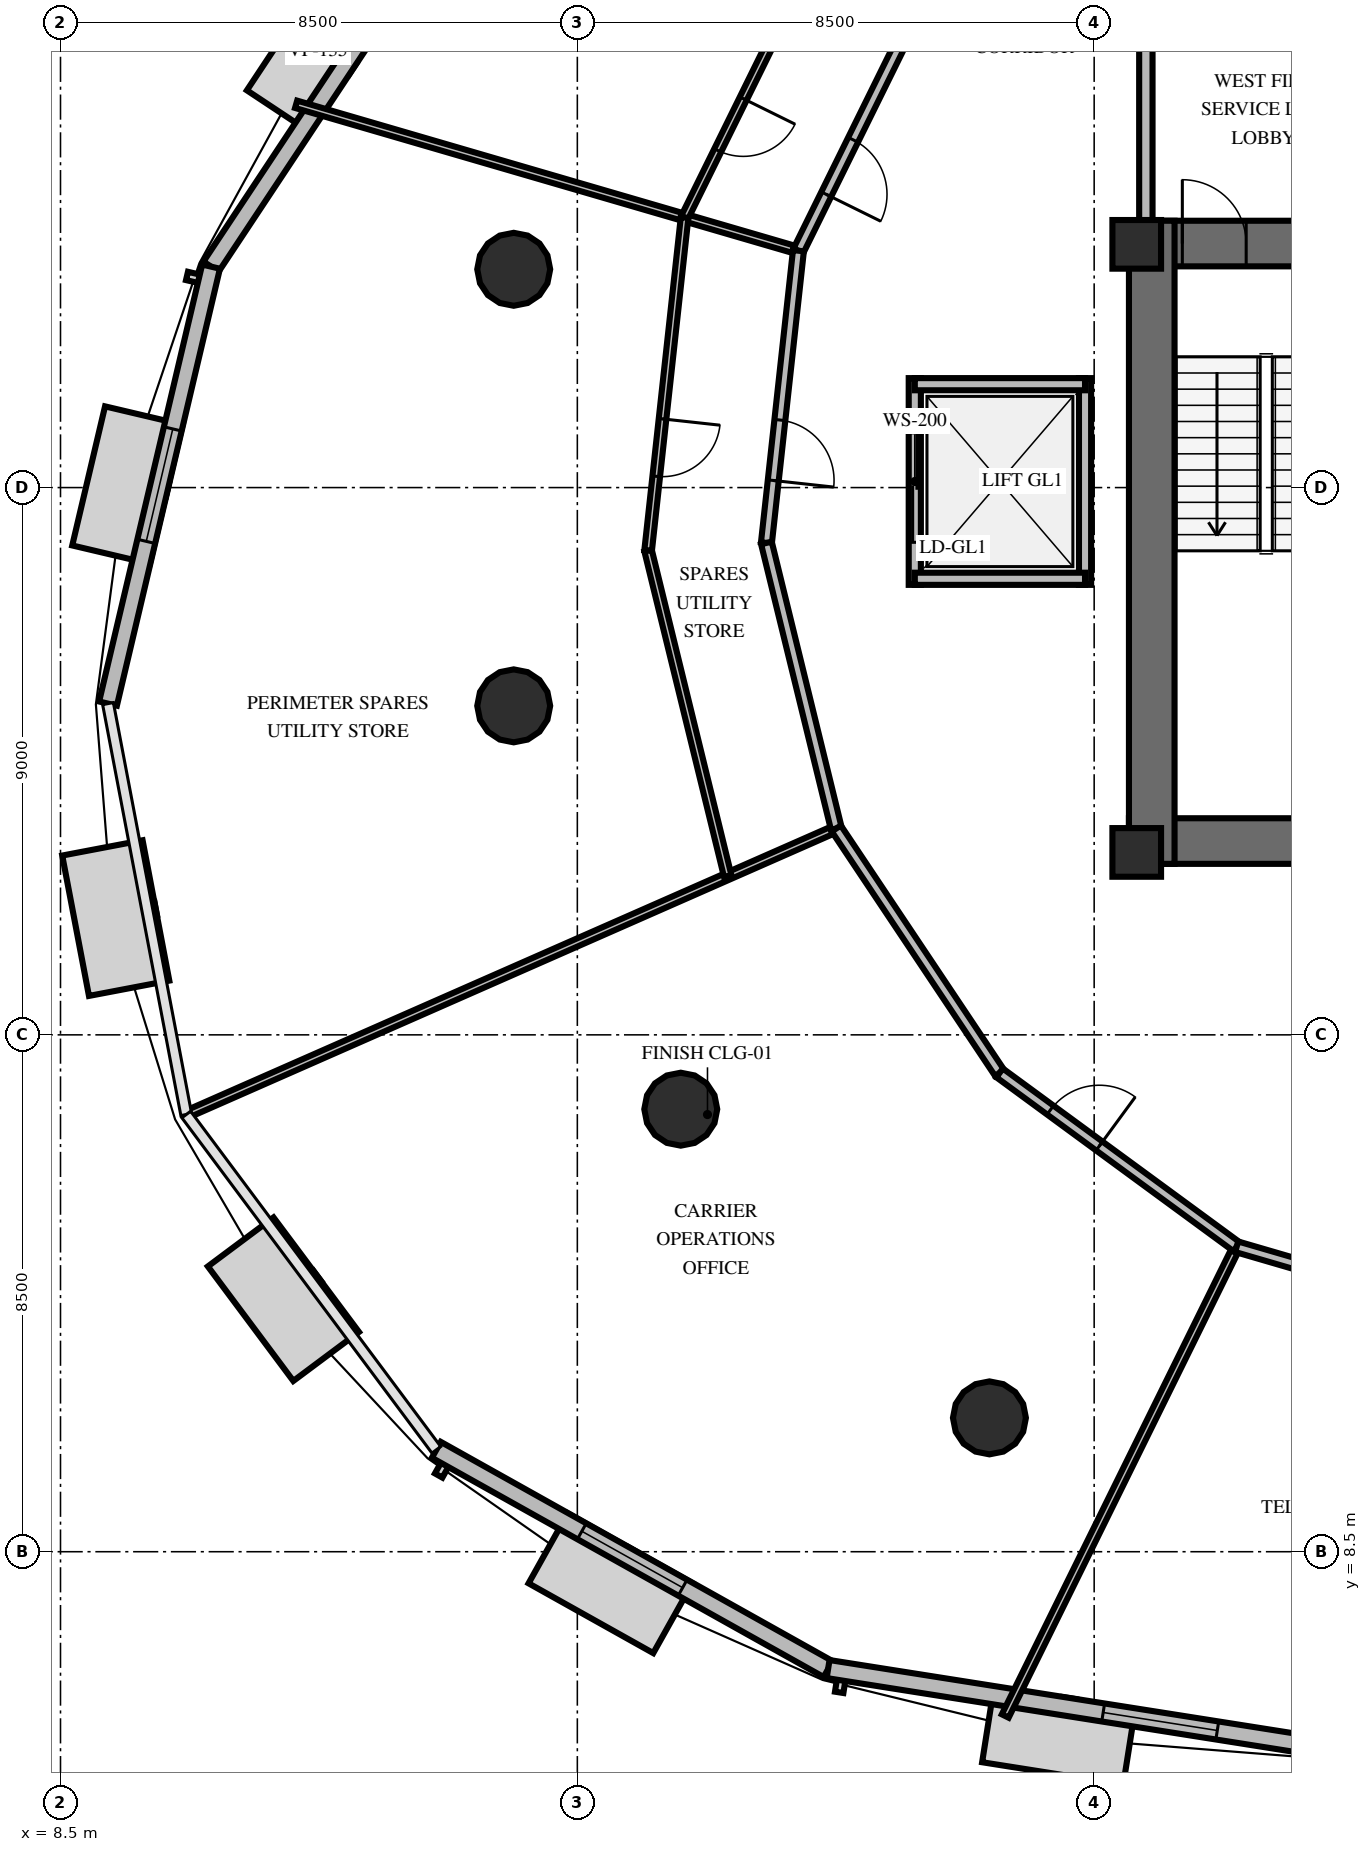
"""IFC4 building model, lengths in metres.
Left out: names, types, materials, properties, quantities, classifications, styles, units other than length and angle.
Written with IfcOpenShell. Run it as: python <this file> out.ifc"""

import sys

from ifc_helpers import new_model, si_unit, direction, frame, frame_2d, origin, origin_2d, place, context, subcontext, project, spatial, rectangle, circle, extrude, element, fill, save


model = new_model("IFC4")
c1 = context("Model", 3, precision=1e-05, world=origin(), true_north=direction((0.0, 1.0)))
c2 = subcontext(c1, "Body", "Model", "MODEL_VIEW")
j1 = project(units=[si_unit("LENGTHUNIT", "METRE"), si_unit("PLANEANGLEUNIT", "RADIAN")], contexts=[c1])
p1 = place(None, origin())
s1 = spatial("IfcSite", under=j1, at=p1, CompositionType="ELEMENT")
p2 = place(p1, origin())
s2 = spatial("IfcBuilding", under=s1, at=p2, CompositionType="ELEMENT")
p3 = place(p2, frame((0.0, 0.0, 133.8)))
s3 = spatial("IfcBuildingStorey", under=s2, at=p3, CompositionType="ELEMENT", Elevation=133.8)
p4 = place(p3, frame((26.072, 20.187, 0.0), z_axis=(0.0, 0.0, 1.0), x_axis=(1.0, 0.0, 0.0)))
e1 = element("IfcWall", 1, at=p4, inside=s3, PredefinedType="SHEAR", context=c2, shape_type="SweptSolid", body=[
    extrude(rectangle(XDim=15.866, YDim=0.75, at=frame_2d((7.933, 0.0))), origin(), (0.0, 0.0, 1.0), 4.0),
])
p5 = place(p3, frame((26.072, 30.013, 0.0), z_axis=(0.0, 0.0, 1.0), x_axis=(1.0, 0.0, 0.0)))
e2 = element("IfcWall", 2, at=p5, inside=s3, PredefinedType="SHEAR", context=c2, shape_type="SweptSolid", body=[
    extrude(rectangle(XDim=15.866, YDim=0.75, at=frame_2d((7.933, 0.0))), origin(), (0.0, 0.0, 1.0), 4.0),
])
p6 = place(p5, frame((0.878, 0.0, 0.0)))
e3 = element("IfcOpeningElement", 3, at=p6, cuts=e2, PredefinedType="OPENING", context=c2, shape_type="SweptSolid", body=[
    extrude(rectangle(XDim=1.05, YDim=2.15, at=frame_2d((0.525, 1.075))), frame((0.0, 0.385, 0.0), z_axis=(0.0, -1.0, 0.0), x_axis=(1.0, 0.0, 0.0)), (0.0, 0.0, 1.0), 0.77),
])
p7 = place(p5, frame((13.928, 0.0, 0.0)))
e4 = element("IfcOpeningElement", 4, at=p7, cuts=e2, PredefinedType="OPENING", context=c2, shape_type="SweptSolid", body=[
    extrude(rectangle(XDim=1.05, YDim=2.15, at=frame_2d((0.525, 1.075))), frame((0.0, 0.385, 0.0), z_axis=(0.0, -1.0, 0.0), x_axis=(1.0, 0.0, 0.0)), (0.0, 0.0, 1.0), 0.77),
])
p8 = place(p5, frame((7.378, 0.0, 0.0)))
e5 = element("IfcOpeningElement", 5, at=p8, cuts=e2, PredefinedType="OPENING", context=c2, shape_type="SweptSolid", body=[
    extrude(rectangle(XDim=1.1, YDim=2.15, at=frame_2d((0.55, 1.075))), frame((0.0, 0.385, 0.0), z_axis=(0.0, -1.0, 0.0), x_axis=(1.0, 0.0, 0.0)), (0.0, 0.0, 1.0), 0.77),
])
p9 = place(p3, frame((26.447, 19.812, 0.0), z_axis=(0.0, 0.0, 1.0), x_axis=(0.0, 1.0, 0.0)))
e6 = element("IfcWall", 6, at=p9, inside=s3, PredefinedType="SHEAR", context=c2, shape_type="SweptSolid", body=[
    extrude(rectangle(XDim=10.576, YDim=0.75, at=frame_2d((5.288, 0.0))), origin(), (0.0, 0.0, 1.0), 4.0),
])
for number, where, z_axis, x_axis in (
    (7, (26.2, 20.0, 0.0), (0.0, 0.0, 1.0), (1.0, 0.0, 0.0)),
    (8, (26.2, 30.0, 0.0), (0.0, 0.0, 1.0), (1.0, 0.0, 0.0)),
):
    element("IfcColumn", number, at=place(p3, frame(where, z_axis=z_axis, x_axis=x_axis)), inside=s3, PredefinedType="PILASTER", context=c2, shape_type="SweptSolid", body=[
        extrude(rectangle(XDim=0.8, YDim=0.8, at=origin_2d()), origin(), (0.0, 0.0, 1.0), 4.0),
    ])
for number, where, z_axis, x_axis in (
    (9, (15.954, 29.59, 0.0), (0.0, 0.0, 1.0), (1.0, 0.0, 0.0)),
    (10, (15.954, 22.41, 0.0), (0.0, 0.0, 1.0), (1.0, 0.0, 0.0)),
    (11, (18.701, 15.778, 0.0), (0.0, 0.0, 1.0), (1.0, 0.0, 0.0)),
    (12, (23.778, 10.701, 0.0), (0.0, 0.0, 1.0), (1.0, 0.0, 0.0)),
):
    element("IfcColumn", number, at=place(p3, frame(where, z_axis=z_axis, x_axis=x_axis)), inside=s3, PredefinedType="COLUMN", context=c2, shape_type="SweptSolid", body=[
        extrude(circle(Radius=0.6, at=origin_2d()), origin(), (0.0, 0.0, 1.0), 4.0),
    ])
p10 = place(p3, frame((15.448, 36.381, 0.0), z_axis=(0.0, 0.0, 1.0), x_axis=(-0.552401321334, -0.833578298775, 0.0)))
e13 = element("IfcWall", 13, at=p10, inside=s3, PredefinedType="SOLIDWALL", context=c2, shape_type="SweptSolid", body=[
    extrude(rectangle(XDim=8.095, YDim=0.3, at=frame_2d((4.047, 0.0))), origin(), (0.0, 0.0, 1.0), 2.9),
])
p11 = place(p10, frame((1.615, 0.0, 0.8)))
e14 = element("IfcOpeningElement", 14, at=p11, cuts=e13, PredefinedType="OPENING", context=c2, shape_type="SweptSolid", body=[
    extrude(rectangle(XDim=1.9, YDim=1.95, at=frame_2d((0.95, 0.975))), frame((0.0, 0.16, 0.0), z_axis=(0.0, -1.0, 0.0), x_axis=(1.0, 0.0, 0.0)), (0.0, 0.0, 1.0), 0.32),
])
p12 = place(p3, frame((10.976, 29.634, 0.0), z_axis=(0.0, 0.0, 1.0), x_axis=(-0.229551679133, -0.973296474157, 0.0)))
e15 = element("IfcWall", 15, at=p12, inside=s3, PredefinedType="SOLIDWALL", context=c2, shape_type="SweptSolid", body=[
    extrude(rectangle(XDim=7.383, YDim=0.3, at=frame_2d((3.692, 0.0))), origin(), (0.0, 0.0, 1.0), 2.9),
])
p13 = place(p12, frame((2.742, 0.0, 0.8)))
e16 = element("IfcOpeningElement", 16, at=p13, cuts=e15, PredefinedType="OPENING", context=c2, shape_type="SweptSolid", body=[
    extrude(rectangle(XDim=1.9, YDim=1.95, at=frame_2d((0.95, 0.975))), frame((0.0, 0.16, 0.0), z_axis=(0.0, -1.0, 0.0), x_axis=(1.0, 0.0, 0.0)), (0.0, 0.0, 1.0), 0.32),
])
p14 = place(p3, frame((14.681, 10.176, 0.0), z_axis=(0.0, 0.0, 1.0), x_axis=(0.872674562052, -0.488302271904, 0.0)))
e17 = element("IfcWall", 17, at=p14, inside=s3, PredefinedType="SOLIDWALL", context=c2, shape_type="SweptSolid", body=[
    extrude(rectangle(XDim=7.383, YDim=0.3, at=frame_2d((3.692, 0.0))), origin(), (0.0, 0.0, 1.0), 2.9),
])
p15 = place(p14, frame((2.742, 0.0, 0.8)))
e18 = element("IfcOpeningElement", 18, at=p15, cuts=e17, PredefinedType="OPENING", context=c2, shape_type="SweptSolid", body=[
    extrude(rectangle(XDim=1.9, YDim=1.95, at=frame_2d((0.95, 0.975))), frame((0.0, 0.16, 0.0), z_axis=(0.0, -1.0, 0.0), x_axis=(1.0, 0.0, 0.0)), (0.0, 0.0, 1.0), 0.32),
])
p16 = place(p3, frame((21.124, 6.57, 0.0), z_axis=(0.0, 0.0, 1.0), x_axis=(0.987774699815, -0.155888236905, 0.0)))
e19 = element("IfcWall", 19, at=p16, inside=s3, PredefinedType="SOLIDWALL", context=c2, shape_type="SweptSolid", body=[
    extrude(rectangle(XDim=8.095, YDim=0.3, at=frame_2d((4.048, 0.0))), origin(), (0.0, 0.0, 1.0), 2.9),
])
p17 = place(p16, frame((4.58, 0.0, 0.8)))
e20 = element("IfcOpeningElement", 20, at=p17, cuts=e19, PredefinedType="OPENING", context=c2, shape_type="SweptSolid", body=[
    extrude(rectangle(XDim=1.9, YDim=1.95, at=frame_2d((0.95, 0.975))), frame((0.0, 0.16, 0.0), z_axis=(0.0, -1.0, 0.0), x_axis=(1.0, 0.0, 0.0)), (0.0, 0.0, 1.0), 0.32),
])
p18 = place(p3, frame((26.35, 30.05, 0.0), z_axis=(0.0, 0.0, 1.0), x_axis=(0.0, 1.0, 0.0)))
e21 = element("IfcWall", 21, at=p18, inside=s3, PredefinedType="SOLIDWALL", context=c2, shape_type="SweptSolid", body=[
    extrude(rectangle(XDim=4.38, YDim=0.22, at=frame_2d((2.19, 0.0))), origin(), (0.0, 0.0, 1.0), 2.8),
])
p19 = place(p3, frame((22.55, 24.4, 0.0), z_axis=(0.0, 0.0, 1.0), x_axis=(0.0, 1.0, 0.0)))
e22 = element("IfcWall", 22, at=p19, inside=s3, PredefinedType="SOLIDWALL", context=c2, shape_type="SweptSolid", body=[
    extrude(rectangle(XDim=3.4, YDim=0.2, at=frame_2d((1.7, 0.0))), origin(), (0.0, 0.0, 1.0), 2.8),
])
p20 = place(p19, frame((0.7, 0.0, 0.0)))
e23 = element("IfcOpeningElement", 23, at=p20, cuts=e22, PredefinedType="OPENING", context=c2, shape_type="SweptSolid", body=[
    extrude(rectangle(XDim=1.8, YDim=2.4, at=frame_2d((0.9, 1.2))), frame((0.0, 0.11, 0.0), z_axis=(0.0, -1.0, 0.0), x_axis=(1.0, 0.0, 0.0)), (0.0, 0.0, 1.0), 0.22),
])
p21 = place(p3, frame((25.35, 24.4, 0.0), z_axis=(0.0, 0.0, 1.0), x_axis=(0.0, 1.0, 0.0)))
e24 = element("IfcWall", 24, at=p21, inside=s3, PredefinedType="SOLIDWALL", context=c2, shape_type="SweptSolid", body=[
    extrude(rectangle(XDim=3.4, YDim=0.2, at=frame_2d((1.7, 0.0))), origin(), (0.0, 0.0, 1.0), 2.8),
])
for number, where, z_axis, x_axis in (
    (25, (22.55, 24.5, 0.0), (0.0, 0.0, 1.0), (1.0, 0.0, 0.0)),
    (26, (22.55, 27.7, 0.0), (0.0, 0.0, 1.0), (1.0, 0.0, 0.0)),
):
    element("IfcWall", number, at=place(p3, frame(where, z_axis=z_axis, x_axis=x_axis)), inside=s3, PredefinedType="SOLIDWALL", context=c2, shape_type="SweptSolid", body=[
        extrude(rectangle(XDim=2.8, YDim=0.2, at=frame_2d((1.4, 0.0))), origin(), (0.0, 0.0, 1.0), 2.8),
    ])
p22 = place(p3, frame((20.636, 29.895, 0.0), z_axis=(0.0, 0.0, 1.0), x_axis=(-0.960054321728, 0.279813686819, 0.0)))
e27 = element("IfcWall", 27, at=p22, inside=s3, PredefinedType="PARTITIONING", context=c2, shape_type="SweptSolid", body=[
    extrude(rectangle(XDim=8.605, YDim=0.125, at=frame_2d((4.302, 0.0))), origin(), (0.0, 0.0, 1.0), 2.8),
])
p23 = place(p3, frame((22.774, 34.231, 0.0), z_axis=(0.0, 0.0, 1.0), x_axis=(-0.442338670076, -0.896848092463, 0.0)))
e28 = element("IfcWall", 28, at=p23, inside=s3, PredefinedType="PARTITIONING", context=c2, shape_type="SweptSolid", body=[
    extrude(rectangle(XDim=4.834, YDim=0.18, at=frame_2d((2.417, 0.0))), origin(), (0.0, 0.0, 1.0), 2.8),
])
p24 = place(p23, frame((2.801, 0.0, 0.0)))
e29 = element("IfcOpeningElement", 29, at=p24, cuts=e28, PredefinedType="OPENING", context=c2, shape_type="SweptSolid", body=[
    extrude(rectangle(XDim=1.0, YDim=2.15, at=frame_2d((0.5, 1.075))), frame((0.0, 0.1, 0.0), z_axis=(0.0, -1.0, 0.0), x_axis=(1.0, 0.0, 0.0)), (0.0, 0.0, 1.0), 0.2),
])
p25 = place(p3, frame((21.202, 35.384, 0.0), z_axis=(0.0, 0.0, 1.0), x_axis=(-0.442298829349, -0.896867741396, 0.0)))
e30 = element("IfcWall", 30, at=p25, inside=s3, PredefinedType="PARTITIONING", context=c2, shape_type="SweptSolid", body=[
    extrude(rectangle(XDim=5.511, YDim=0.125, at=frame_2d((2.756, 0.0))), origin(), (0.0, 0.0, 1.0), 2.8),
])
p26 = place(p25, frame((3.331, 0.0, 0.0)))
e31 = element("IfcOpeningElement", 31, at=p26, cuts=e30, PredefinedType="OPENING", context=c2, shape_type="SweptSolid", body=[
    extrude(rectangle(XDim=0.95, YDim=2.15, at=frame_2d((0.475, 1.075))), frame((0.0, 0.073, 0.0), z_axis=(0.0, -1.0, 0.0), x_axis=(1.0, 0.0, 0.0)), (0.0, 0.0, 1.0), 0.145),
])
p27 = place(p3, frame((21.259, 20.394, 0.0), z_axis=(0.0, 0.0, 1.0), x_axis=(-0.915308559751, -0.402753324563, 0.0)))
e32 = element("IfcWall", 32, at=p27, inside=s3, PredefinedType="PARTITIONING", context=c2, shape_type="SweptSolid", body=[
    extrude(rectangle(XDim=11.68, YDim=0.125, at=frame_2d((5.84, 0.0))), origin(), (0.0, 0.0, 1.0), 2.8),
])
p28 = place(p3, frame((20.636, 29.895, 0.0), z_axis=(0.0, 0.0, 1.0), x_axis=(-0.108829517581, -0.994060428799, 0.0)))
e33 = element("IfcWall", 33, at=p28, inside=s3, PredefinedType="PARTITIONING", context=c2, shape_type="SweptSolid", body=[
    extrude(rectangle(XDim=4.834, YDim=0.18, at=frame_2d((2.417, 0.0))), origin(), (0.0, 0.0, 1.0), 2.8),
])
p29 = place(p28, frame((2.801, 0.0, 0.0)))
e34 = element("IfcOpeningElement", 34, at=p29, cuts=e33, PredefinedType="OPENING", context=c2, shape_type="SweptSolid", body=[
    extrude(rectangle(XDim=1.0, YDim=2.15, at=frame_2d((0.5, 1.075))), frame((0.0, 0.1, 0.0), z_axis=(0.0, -1.0, 0.0), x_axis=(1.0, 0.0, 0.0)), (0.0, 0.0, 1.0), 0.2),
])
p30 = place(p3, frame((20.11, 25.09, 0.0), z_axis=(0.0, 0.0, 1.0), x_axis=(0.237660645322, -0.971348247368, 0.0)))
e35 = element("IfcWall", 35, at=p30, inside=s3, PredefinedType="PARTITIONING", context=c2, shape_type="SweptSolid", body=[
    extrude(rectangle(XDim=4.834, YDim=0.18, at=frame_2d((2.417, 0.0))), origin(), (0.0, 0.0, 1.0), 2.8),
])
p31 = place(p3, frame((18.764, 30.441, 0.0), z_axis=(0.0, 0.0, 1.0), x_axis=(-0.108836706904, -0.994059641687, 0.0)))
e36 = element("IfcWall", 36, at=p31, inside=s3, PredefinedType="PARTITIONING", context=c2, shape_type="SweptSolid", body=[
    extrude(rectangle(XDim=5.511, YDim=0.125, at=frame_2d((2.756, 0.0))), origin(), (0.0, 0.0, 1.0), 2.8),
])
p32 = place(p31, frame((3.331, 0.0, 0.0)))
e37 = element("IfcOpeningElement", 37, at=p32, cuts=e36, PredefinedType="OPENING", context=c2, shape_type="SweptSolid", body=[
    extrude(rectangle(XDim=0.95, YDim=2.15, at=frame_2d((0.475, 1.075))), frame((0.0, 0.073, 0.0), z_axis=(0.0, -1.0, 0.0), x_axis=(1.0, 0.0, 0.0)), (0.0, 0.0, 1.0), 0.145),
])
p33 = place(p3, frame((18.164, 24.962, 0.0), z_axis=(0.0, 0.0, 1.0), x_axis=(0.237686219913, -0.971341989653, 0.0)))
e38 = element("IfcWall", 38, at=p33, inside=s3, PredefinedType="PARTITIONING", context=c2, shape_type="SweptSolid", body=[
    extrude(rectangle(XDim=5.512, YDim=0.125, at=frame_2d((2.756, 0.0))), origin(), (0.0, 0.0, 1.0), 2.8),
])
p34 = place(p3, frame((27.843, 13.515, 0.0), z_axis=(0.0, 0.0, 1.0), x_axis=(-0.442281229031, -0.896876420945, 0.0)))
e39 = element("IfcWall", 39, at=p34, inside=s3, PredefinedType="PARTITIONING", context=c2, shape_type="SweptSolid", body=[
    extrude(rectangle(XDim=8.605, YDim=0.125, at=frame_2d((4.302, 0.0))), origin(), (0.0, 0.0, 1.0), 2.8),
])
p35 = place(p3, frame((21.259, 20.394, 0.0), z_axis=(0.0, 0.0, 1.0), x_axis=(0.555550637261, -0.831482705436, 0.0)))
e40 = element("IfcWall", 40, at=p35, inside=s3, PredefinedType="PARTITIONING", context=c2, shape_type="SweptSolid", body=[
    extrude(rectangle(XDim=4.834, YDim=0.18, at=frame_2d((2.417, 0.0))), origin(), (0.0, 0.0, 1.0), 2.8),
])
p36 = place(p3, frame((23.945, 16.374, 0.0), z_axis=(0.0, 0.0, 1.0), x_axis=(0.806443526367, -0.591311118431, 0.0)))
e41 = element("IfcWall", 41, at=p36, inside=s3, PredefinedType="PARTITIONING", context=c2, shape_type="SweptSolid", body=[
    extrude(rectangle(XDim=4.834, YDim=0.18, at=frame_2d((2.417, 0.0))), origin(), (0.0, 0.0, 1.0), 2.8),
])
p37 = place(p36, frame((1.034, 0.0, 0.0)))
e42 = element("IfcOpeningElement", 42, at=p37, cuts=e41, PredefinedType="OPENING", context=c2, shape_type="SweptSolid", body=[
    extrude(rectangle(XDim=1.0, YDim=2.15, at=frame_2d((0.5, 1.075))), frame((0.0, 0.1, 0.0), z_axis=(0.0, -1.0, 0.0), x_axis=(1.0, 0.0, 0.0)), (0.0, 0.0, 1.0), 0.2),
])
p38 = place(p3, frame((27.843, 13.515, 0.0), z_axis=(0.0, 0.0, 1.0), x_axis=(0.9600525837, -0.279819650007, 0.0)))
e43 = element("IfcWall", 43, at=p38, inside=s3, PredefinedType="PARTITIONING", context=c2, shape_type="SweptSolid", body=[
    extrude(rectangle(XDim=4.834, YDim=0.18, at=frame_2d((2.417, 0.0))), origin(), (0.0, 0.0, 1.0), 2.8),
])
p39 = place(p13, origin())
e44 = element("IfcWindow", 44, at=p39, inside=s3, PartitioningType="SINGLE_PANEL", PredefinedType="WINDOW", context=c2, shape_type="SweptSolid", body=[
    extrude(rectangle(XDim=1.9, YDim=1.95, at=frame_2d((0.95, 0.975))), frame((0.0, 0.03, 0.0), z_axis=(0.0, -1.0, 0.0), x_axis=(1.0, 0.0, 0.0)), (0.0, 0.0, 1.0), 0.06),
])
fill(e16, e44)
p40 = place(p15, origin())
e45 = element("IfcWindow", 45, at=p40, inside=s3, PartitioningType="SINGLE_PANEL", PredefinedType="WINDOW", context=c2, shape_type="SweptSolid", body=[
    extrude(rectangle(XDim=1.9, YDim=1.95, at=frame_2d((0.95, 0.975))), frame((0.0, 0.03, 0.0), z_axis=(0.0, -1.0, 0.0), x_axis=(1.0, 0.0, 0.0)), (0.0, 0.0, 1.0), 0.06),
])
fill(e18, e45)
p41 = place(p17, origin())
e46 = element("IfcWindow", 46, at=p41, inside=s3, PartitioningType="SINGLE_PANEL", PredefinedType="WINDOW", context=c2, shape_type="SweptSolid", body=[
    extrude(rectangle(XDim=1.9, YDim=1.95, at=frame_2d((0.95, 0.975))), frame((0.0, 0.03, 0.0), z_axis=(0.0, -1.0, 0.0), x_axis=(1.0, 0.0, 0.0)), (0.0, 0.0, 1.0), 0.06),
])
fill(e20, e46)
p42 = place(p6, origin())
e47 = element("IfcDoor", 47, at=p42, inside=s3, OperationType="SINGLE_SWING_LEFT", PredefinedType="DOOR", context=c2, shape_type="SweptSolid", body=[
    extrude(rectangle(XDim=1.05, YDim=2.15, at=frame_2d((0.525, 1.075))), frame((0.0, 0.025, 0.0), z_axis=(0.0, -1.0, 0.0), x_axis=(1.0, 0.0, 0.0)), (0.0, 0.0, 1.0), 0.05),
])
fill(e3, e47)
p43 = place(p20, origin())
e48 = element("IfcDoor", 48, at=p43, inside=s3, OperationType="DOUBLE_DOOR_SLIDING", PredefinedType="USERDEFINED", context=c2, shape_type="SweptSolid", body=[
    extrude(rectangle(XDim=1.8, YDim=2.4, at=frame_2d((0.9, 1.2))), frame((0.0, 0.025, 0.0), z_axis=(0.0, -1.0, 0.0), x_axis=(1.0, 0.0, 0.0)), (0.0, 0.0, 1.0), 0.05),
])
fill(e23, e48)
p44 = place(p24, origin())
e49 = element("IfcDoor", 49, at=p44, inside=s3, OperationType="SINGLE_SWING_RIGHT", PredefinedType="DOOR", context=c2, shape_type="SweptSolid", body=[
    extrude(rectangle(XDim=1.0, YDim=2.15, at=frame_2d((0.5, 1.075))), frame((0.0, 0.025, 0.0), z_axis=(0.0, -1.0, 0.0), x_axis=(1.0, 0.0, 0.0)), (0.0, 0.0, 1.0), 0.05),
])
fill(e29, e49)
p45 = place(p26, origin())
e50 = element("IfcDoor", 50, at=p45, inside=s3, OperationType="SINGLE_SWING_LEFT", PredefinedType="DOOR", context=c2, shape_type="SweptSolid", body=[
    extrude(rectangle(XDim=0.95, YDim=2.15, at=frame_2d((0.475, 1.075))), frame((0.0, 0.025, 0.0), z_axis=(0.0, -1.0, 0.0), x_axis=(1.0, 0.0, 0.0)), (0.0, 0.0, 1.0), 0.05),
])
fill(e31, e50)
p46 = place(p29, origin())
e51 = element("IfcDoor", 51, at=p46, inside=s3, OperationType="SINGLE_SWING_RIGHT", PredefinedType="DOOR", context=c2, shape_type="SweptSolid", body=[
    extrude(rectangle(XDim=1.0, YDim=2.15, at=frame_2d((0.5, 1.075))), frame((0.0, 0.025, 0.0), z_axis=(0.0, -1.0, 0.0), x_axis=(1.0, 0.0, 0.0)), (0.0, 0.0, 1.0), 0.05),
])
fill(e34, e51)
p47 = place(p32, origin())
e52 = element("IfcDoor", 52, at=p47, inside=s3, OperationType="SINGLE_SWING_LEFT", PredefinedType="DOOR", context=c2, shape_type="SweptSolid", body=[
    extrude(rectangle(XDim=0.95, YDim=2.15, at=frame_2d((0.475, 1.075))), frame((0.0, 0.025, 0.0), z_axis=(0.0, -1.0, 0.0), x_axis=(1.0, 0.0, 0.0)), (0.0, 0.0, 1.0), 0.05),
])
fill(e37, e52)
p48 = place(p37, origin())
e53 = element("IfcDoor", 53, at=p48, inside=s3, OperationType="SINGLE_SWING_RIGHT", PredefinedType="DOOR", context=c2, shape_type="SweptSolid", body=[
    extrude(rectangle(XDim=1.0, YDim=2.15, at=frame_2d((0.5, 1.075))), frame((0.0, 0.025, 0.0), z_axis=(0.0, -1.0, 0.0), x_axis=(1.0, 0.0, 0.0)), (0.0, 0.0, 1.0), 0.05),
])
fill(e42, e53)
save(model, sys.argv[1])
